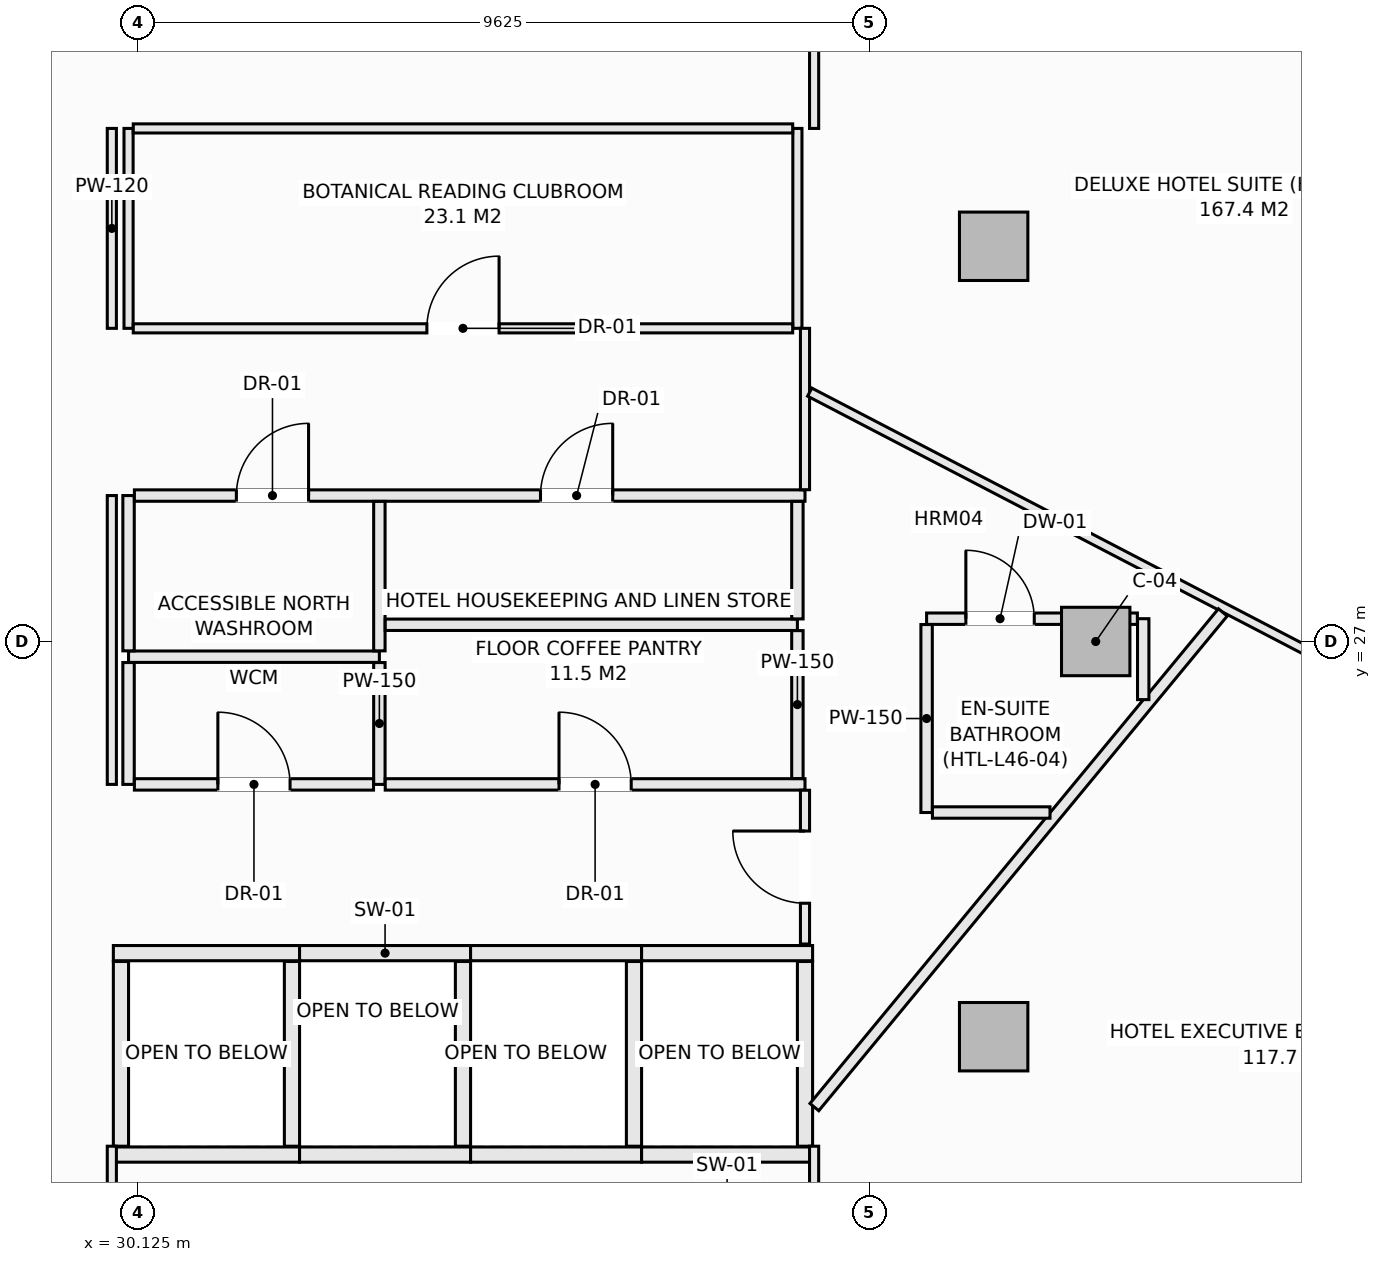
"""IFC4 building model, lengths in metres.
Left out: names, types, materials, properties, quantities, classifications, styles, units other than length and angle.
Written with IfcOpenShell. Run it as: python <this file> out.ifc"""

import sys

from ifc_helpers import new_model, si_unit, direction, frame, frame_2d, origin, origin_2d, place, context, subcontext, project, spatial, rectangle, extrude, element, fill, save


model = new_model("IFC4")
c1 = context("Model", 3, precision=1e-05, world=origin(), true_north=direction((0.0, 1.0)))
c2 = subcontext(c1, "Body", "Model", "MODEL_VIEW")
j1 = project(units=[si_unit("LENGTHUNIT", "METRE"), si_unit("PLANEANGLEUNIT", "RADIAN")], contexts=[c1])
p1 = place(None, origin())
s1 = spatial("IfcSite", under=j1, at=p1, CompositionType="ELEMENT")
p2 = place(p1, origin())
s2 = spatial("IfcBuilding", under=s1, at=p2, CompositionType="ELEMENT")
p3 = place(p2, frame((0.0, 0.0, 176.7)))
s3 = spatial("IfcBuildingStorey", under=s2, at=p3, CompositionType="ELEMENT", Elevation=176.7)
for number, where, z_axis, x_axis in (
    (1, (42.725, 27.0, -0.27), (0.0, 0.0, 1.0), (1.0, 0.0, 0.0)),
    (2, (41.382, 32.199, -0.27), (0.0, 0.0, 1.0), (1.0, 0.0, 0.0)),
    (3, (41.382, 21.801, -0.27), (0.0, 0.0, 1.0), (1.0, 0.0, 0.0)),
):
    element("IfcColumn", number, at=place(p3, frame(where, z_axis=z_axis, x_axis=x_axis)), inside=s3, PredefinedType="COLUMN", context=c2, shape_type="SweptSolid", body=[
        extrude(rectangle(XDim=0.9, YDim=0.9, at=origin_2d()), origin(), (0.0, 0.0, 1.0), 3.4),
    ])
for number, where, z_axis, x_axis in (
    (4, (29.8, 22.9, 0.0), (0.0, 0.0, 1.0), (1.0, 0.0, 0.0)),
    (5, (29.8, 20.25, 0.0), (0.0, 0.0, 1.0), (1.0, 0.0, 0.0)),
):
    element("IfcWall", number, at=place(p3, frame(where, z_axis=z_axis, x_axis=x_axis)), inside=s3, PredefinedType="SOLIDWALL", context=c2, shape_type="SweptSolid", body=[
        extrude(rectangle(XDim=2.45, YDim=0.2, at=frame_2d((1.225, 0.0))), origin(), (0.0, 0.0, 1.0), 3.13),
    ])
for number, where, z_axis, x_axis in (
    (6, (29.9, 20.36, 0.0), (0.0, 0.0, 1.0), (0.0, 1.0, 0.0)),
    (7, (32.15, 20.36, 0.0), (0.0, 0.0, 1.0), (0.0, 1.0, 0.0)),
):
    element("IfcWall", number, at=place(p3, frame(where, z_axis=z_axis, x_axis=x_axis)), inside=s3, PredefinedType="SOLIDWALL", context=c2, shape_type="SweptSolid", body=[
        extrude(rectangle(XDim=2.43, YDim=0.2, at=frame_2d((1.215, 0.0))), origin(), (0.0, 0.0, 1.0), 3.13),
    ])
for number, where, z_axis, x_axis in (
    (8, (32.25, 22.9, 0.0), (0.0, 0.0, 1.0), (1.0, 0.0, 0.0)),
    (9, (32.25, 20.25, 0.0), (0.0, 0.0, 1.0), (1.0, 0.0, 0.0)),
):
    element("IfcWall", number, at=place(p3, frame(where, z_axis=z_axis, x_axis=x_axis)), inside=s3, PredefinedType="SOLIDWALL", context=c2, shape_type="SweptSolid", body=[
        extrude(rectangle(XDim=2.25, YDim=0.2, at=frame_2d((1.125, 0.0))), origin(), (0.0, 0.0, 1.0), 3.13),
    ])
p4 = place(p3, frame((34.4, 20.36, 0.0), z_axis=(0.0, 0.0, 1.0), x_axis=(0.0, 1.0, 0.0)))
e10 = element("IfcWall", 10, at=p4, inside=s3, PredefinedType="SOLIDWALL", context=c2, shape_type="SweptSolid", body=[
    extrude(rectangle(XDim=2.43, YDim=0.2, at=frame_2d((1.215, 0.0))), origin(), (0.0, 0.0, 1.0), 3.13),
])
for number, where, z_axis, x_axis in (
    (11, (34.5, 22.9, 0.0), (0.0, 0.0, 1.0), (1.0, 0.0, 0.0)),
    (12, (34.5, 20.25, 0.0), (0.0, 0.0, 1.0), (1.0, 0.0, 0.0)),
):
    element("IfcWall", number, at=place(p3, frame(where, z_axis=z_axis, x_axis=x_axis)), inside=s3, PredefinedType="SOLIDWALL", context=c2, shape_type="SweptSolid", body=[
        extrude(rectangle(XDim=2.25, YDim=0.2, at=frame_2d((1.125, 0.0))), origin(), (0.0, 0.0, 1.0), 3.13),
    ])
p5 = place(p3, frame((36.65, 20.36, 0.0), z_axis=(0.0, 0.0, 1.0), x_axis=(0.0, 1.0, 0.0)))
e13 = element("IfcWall", 13, at=p5, inside=s3, PredefinedType="SOLIDWALL", context=c2, shape_type="SweptSolid", body=[
    extrude(rectangle(XDim=2.43, YDim=0.2, at=frame_2d((1.215, 0.0))), origin(), (0.0, 0.0, 1.0), 3.13),
])
for number, where, z_axis, x_axis in (
    (14, (36.75, 22.9, 0.0), (0.0, 0.0, 1.0), (1.0, 0.0, 0.0)),
    (15, (36.75, 20.25, 0.0), (0.0, 0.0, 1.0), (1.0, 0.0, 0.0)),
):
    element("IfcWall", number, at=place(p3, frame(where, z_axis=z_axis, x_axis=x_axis)), inside=s3, PredefinedType="SOLIDWALL", context=c2, shape_type="SweptSolid", body=[
        extrude(rectangle(XDim=2.25, YDim=0.2, at=frame_2d((1.125, 0.0))), origin(), (0.0, 0.0, 1.0), 3.13),
    ])
p6 = place(p3, frame((38.9, 20.36, 0.0), z_axis=(0.0, 0.0, 1.0), x_axis=(0.0, 1.0, 0.0)))
e16 = element("IfcWall", 16, at=p6, inside=s3, PredefinedType="SOLIDWALL", context=c2, shape_type="SweptSolid", body=[
    extrude(rectangle(XDim=2.43, YDim=0.2, at=frame_2d((1.215, 0.0))), origin(), (0.0, 0.0, 1.0), 3.13),
])
p7 = place(p3, frame((30.0, 26.8, 0.0), z_axis=(0.0, 0.0, 1.0), x_axis=(1.0, 0.0, 0.0)))
e17 = element("IfcWall", 17, at=p7, inside=s3, PredefinedType="PARTITIONING", context=c2, shape_type="SweptSolid", body=[
    extrude(rectangle(XDim=3.3, YDim=0.15, at=frame_2d((1.65, 0.0))), origin(), (0.0, 0.0, 1.0), 3.13),
])
p8 = place(p3, frame((30.0, 25.12, 0.0), z_axis=(0.0, 0.0, 1.0), x_axis=(0.0, 1.0, 0.0)))
e18 = element("IfcWall", 18, at=p8, inside=s3, PredefinedType="PARTITIONING", context=c2, shape_type="SweptSolid", body=[
    extrude(rectangle(XDim=1.603, YDim=0.15, at=frame_2d((0.801, 0.0))), origin(), (0.0, 0.0, 1.0), 3.13),
])
p9 = place(p3, frame((30.0, 26.877, 0.0), z_axis=(0.0, 0.0, 1.0), x_axis=(0.0, 1.0, 0.0)))
e19 = element("IfcWall", 19, at=p9, inside=s3, PredefinedType="PARTITIONING", context=c2, shape_type="SweptSolid", body=[
    extrude(rectangle(XDim=2.043, YDim=0.15, at=frame_2d((1.021, 0.0))), origin(), (0.0, 0.0, 1.0), 3.13),
])
p10 = place(p3, frame((30.0, 31.12, 0.0), z_axis=(0.0, 0.0, 1.0), x_axis=(0.0, 1.0, 0.0)))
e20 = element("IfcWall", 20, at=p10, inside=s3, PredefinedType="PARTITIONING", context=c2, shape_type="SweptSolid", body=[
    extrude(rectangle(XDim=2.63, YDim=0.12, at=frame_2d((1.315, 0.0))), origin(), (0.0, 0.0, 1.0), 3.13),
])
p11 = place(p3, frame((30.077, 28.92, 0.0), z_axis=(0.0, 0.0, 1.0), x_axis=(1.0, 0.0, 0.0)))
e21 = element("IfcWall", 21, at=p11, inside=s3, PredefinedType="PARTITIONING", context=c2, shape_type="SweptSolid", body=[
    extrude(rectangle(XDim=8.823, YDim=0.15, at=frame_2d((4.412, 0.0))), origin(), (0.0, 0.0, 1.0), 3.13),
])
p12 = place(p11, frame((1.342, 0.0, 0.0)))
e22 = element("IfcOpeningElement", 22, at=p12, cuts=e21, PredefinedType="OPENING", context=c2, shape_type="SweptSolid", body=[
    extrude(rectangle(XDim=0.95, YDim=2.1, at=frame_2d((0.475, 1.05))), frame((0.0, 0.085, 0.0), z_axis=(0.0, -1.0, 0.0), x_axis=(1.0, 0.0, 0.0)), (0.0, 0.0, 1.0), 0.17),
])
p13 = place(p11, frame((5.343, 0.0, 0.0)))
e23 = element("IfcOpeningElement", 23, at=p13, cuts=e21, PredefinedType="OPENING", context=c2, shape_type="SweptSolid", body=[
    extrude(rectangle(XDim=0.95, YDim=2.1, at=frame_2d((0.475, 1.05))), frame((0.0, 0.085, 0.0), z_axis=(0.0, -1.0, 0.0), x_axis=(1.0, 0.0, 0.0)), (0.0, 0.0, 1.0), 0.17),
])
p14 = place(p3, frame((33.3, 25.12, 0.0), z_axis=(0.0, 0.0, 1.0), x_axis=(0.0, 1.0, 0.0)))
e24 = element("IfcWall", 24, at=p14, inside=s3, PredefinedType="PARTITIONING", context=c2, shape_type="SweptSolid", body=[
    extrude(rectangle(XDim=1.603, YDim=0.15, at=frame_2d((0.801, 0.0))), origin(), (0.0, 0.0, 1.0), 3.13),
])
p15 = place(p3, frame((33.3, 26.877, 0.0), z_axis=(0.0, 0.0, 1.0), x_axis=(0.0, 1.0, 0.0)))
e25 = element("IfcWall", 25, at=p15, inside=s3, PredefinedType="PARTITIONING", context=c2, shape_type="SweptSolid", body=[
    extrude(rectangle(XDim=1.966, YDim=0.15, at=frame_2d((0.983, 0.0))), origin(), (0.0, 0.0, 1.0), 3.13),
])
p16 = place(p3, frame((30.077, 25.12, 0.0), z_axis=(0.0, 0.0, 1.0), x_axis=(1.0, 0.0, 0.0)))
e26 = element("IfcWall", 26, at=p16, inside=s3, PredefinedType="PARTITIONING", context=c2, shape_type="SweptSolid", body=[
    extrude(rectangle(XDim=3.146, YDim=0.15, at=frame_2d((1.573, 0.0))), origin(), (0.0, 0.0, 1.0), 3.13),
])
p17 = place(p16, frame((1.098, 0.0, 0.0)))
e27 = element("IfcOpeningElement", 27, at=p17, cuts=e26, PredefinedType="OPENING", context=c2, shape_type="SweptSolid", body=[
    extrude(rectangle(XDim=0.95, YDim=2.1, at=frame_2d((0.475, 1.05))), frame((0.0, 0.085, 0.0), z_axis=(0.0, -1.0, 0.0), x_axis=(1.0, 0.0, 0.0)), (0.0, 0.0, 1.0), 0.17),
])
p18 = place(p3, frame((33.377, 25.12, 0.0), z_axis=(0.0, 0.0, 1.0), x_axis=(1.0, 0.0, 0.0)))
e28 = element("IfcWall", 28, at=p18, inside=s3, PredefinedType="PARTITIONING", context=c2, shape_type="SweptSolid", body=[
    extrude(rectangle(XDim=5.523, YDim=0.15, at=frame_2d((2.761, 0.0))), origin(), (0.0, 0.0, 1.0), 3.13),
])
p19 = place(p18, frame((2.287, 0.0, 0.0)))
e29 = element("IfcOpeningElement", 29, at=p19, cuts=e28, PredefinedType="OPENING", context=c2, shape_type="SweptSolid", body=[
    extrude(rectangle(XDim=0.95, YDim=2.1, at=frame_2d((0.475, 1.05))), frame((0.0, 0.085, 0.0), z_axis=(0.0, -1.0, 0.0), x_axis=(1.0, 0.0, 0.0)), (0.0, 0.0, 1.0), 0.17),
])
p20 = place(p3, frame((33.377, 27.22, 0.0), z_axis=(0.0, 0.0, 1.0), x_axis=(1.0, 0.0, 0.0)))
e30 = element("IfcWall", 30, at=p20, inside=s3, PredefinedType="PARTITIONING", context=c2, shape_type="SweptSolid", body=[
    extrude(rectangle(XDim=5.423, YDim=0.15, at=frame_2d((2.711, 0.0))), origin(), (0.0, 0.0, 1.0), 3.13),
])
p21 = place(p3, frame((38.8, 25.197, 0.0), z_axis=(0.0, 0.0, 1.0), x_axis=(0.0, 1.0, 0.0)))
e31 = element("IfcWall", 31, at=p21, inside=s3, PredefinedType="PARTITIONING", context=c2, shape_type="SweptSolid", body=[
    extrude(rectangle(XDim=1.946, YDim=0.15, at=frame_2d((0.973, 0.0))), origin(), (0.0, 0.0, 1.0), 3.13),
])
p22 = place(p3, frame((38.8, 27.297, 0.0), z_axis=(0.0, 0.0, 1.0), x_axis=(0.0, 1.0, 0.0)))
e32 = element("IfcWall", 32, at=p22, inside=s3, PredefinedType="PARTITIONING", context=c2, shape_type="SweptSolid", body=[
    extrude(rectangle(XDim=1.546, YDim=0.15, at=frame_2d((0.773, 0.0))), origin(), (0.0, 0.0, 1.0), 3.13),
])
p23 = place(p3, frame((38.8, 31.12, 0.0), z_axis=(0.0, 0.0, 1.0), x_axis=(0.0, 1.0, 0.0)))
e33 = element("IfcWall", 33, at=p23, inside=s3, PredefinedType="PARTITIONING", context=c2, shape_type="SweptSolid", body=[
    extrude(rectangle(XDim=2.63, YDim=0.12, at=frame_2d((1.315, 0.0))), origin(), (0.0, 0.0, 1.0), 3.13),
])
p24 = place(p3, frame((30.062, 31.12, 0.0), z_axis=(0.0, 0.0, 1.0), x_axis=(1.0, 0.0, 0.0)))
e34 = element("IfcWall", 34, at=p24, inside=s3, PredefinedType="PARTITIONING", context=c2, shape_type="SweptSolid", body=[
    extrude(rectangle(XDim=8.676, YDim=0.12, at=frame_2d((4.338, 0.0))), origin(), (0.0, 0.0, 1.0), 3.13),
])
p25 = place(p24, frame((3.863, 0.0, 0.0)))
e35 = element("IfcOpeningElement", 35, at=p25, cuts=e34, PredefinedType="OPENING", context=c2, shape_type="SweptSolid", body=[
    extrude(rectangle(XDim=0.95, YDim=2.1, at=frame_2d((0.475, 1.05))), frame((0.0, 0.07, 0.0), z_axis=(0.0, -1.0, 0.0), x_axis=(1.0, 0.0, 0.0)), (0.0, 0.0, 1.0), 0.14),
])
p26 = place(p3, frame((30.062, 33.75, 0.0), z_axis=(0.0, 0.0, 1.0), x_axis=(1.0, 0.0, 0.0)))
e36 = element("IfcWall", 36, at=p26, inside=s3, PredefinedType="PARTITIONING", context=c2, shape_type="SweptSolid", body=[
    extrude(rectangle(XDim=8.676, YDim=0.12, at=frame_2d((4.338, 0.0))), origin(), (0.0, 0.0, 1.0), 3.13),
])
p27 = place(p3, frame((39.02, 19.44, 0.0), z_axis=(0.0, 0.0, 1.0), x_axis=(0.0, 1.0, 0.0)))
e37 = element("IfcWall", 37, at=p27, inside=s3, PredefinedType="PARTITIONING", context=c2, shape_type="SweptSolid", body=[
    extrude(rectangle(XDim=0.92, YDim=0.12, at=frame_2d((0.46, 0.0))), origin(), (0.0, 0.0, 1.0), 3.13),
])
p28 = place(p3, frame((39.02, 33.75, 0.0), z_axis=(0.0, 0.0, 1.0), x_axis=(0.0, 1.0, 0.0)))
e38 = element("IfcWall", 38, at=p28, inside=s3, PredefinedType="PARTITIONING", context=c2, shape_type="SweptSolid", body=[
    extrude(rectangle(XDim=2.0, YDim=0.12, at=frame_2d((1.0, 0.0))), origin(), (0.0, 0.0, 1.0), 3.13),
])
p29 = place(p3, frame((29.78, 19.44, 0.0), z_axis=(0.0, 0.0, 1.0), x_axis=(0.0, 1.0, 0.0)))
e39 = element("IfcWall", 39, at=p29, inside=s3, PredefinedType="PARTITIONING", context=c2, shape_type="SweptSolid", body=[
    extrude(rectangle(XDim=0.92, YDim=0.12, at=frame_2d((0.46, 0.0))), origin(), (0.0, 0.0, 1.0), 3.13),
])
p30 = place(p3, frame((29.78, 25.12, 0.0), z_axis=(0.0, 0.0, 1.0), x_axis=(0.0, 1.0, 0.0)))
e40 = element("IfcWall", 40, at=p30, inside=s3, PredefinedType="PARTITIONING", context=c2, shape_type="SweptSolid", body=[
    extrude(rectangle(XDim=3.8, YDim=0.12, at=frame_2d((1.9, 0.0))), origin(), (0.0, 0.0, 1.0), 3.13),
])
p31 = place(p3, frame((29.78, 31.12, 0.0), z_axis=(0.0, 0.0, 1.0), x_axis=(0.0, 1.0, 0.0)))
e41 = element("IfcWall", 41, at=p31, inside=s3, PredefinedType="PARTITIONING", context=c2, shape_type="SweptSolid", body=[
    extrude(rectangle(XDim=2.63, YDim=0.12, at=frame_2d((1.315, 0.0))), origin(), (0.0, 0.0, 1.0), 3.13),
])
p32 = place(p3, frame((38.9, 23.02, 0.0), z_axis=(0.0, 0.0, 1.0), x_axis=(0.0, 1.0, 0.0)))
e42 = element("IfcWall", 42, at=p32, inside=s3, PredefinedType="PARTITIONING", context=c2, shape_type="SweptSolid", body=[
    extrude(rectangle(XDim=2.023, YDim=0.12, at=frame_2d((1.011, 0.0))), origin(), (0.0, 0.0, 1.0), 3.13),
])
p33 = place(p32, frame((0.537, 0.0, 0.0)))
e43 = element("IfcOpeningElement", 43, at=p33, cuts=e42, PredefinedType="OPENING", context=c2, shape_type="SweptSolid", body=[
    extrude(rectangle(XDim=0.95, YDim=2.1, at=frame_2d((0.475, 1.05))), frame((0.0, 0.07, 0.0), z_axis=(0.0, -1.0, 0.0), x_axis=(1.0, 0.0, 0.0)), (0.0, 0.0, 1.0), 0.14),
])
p34 = place(p3, frame((38.9, 28.997, 0.0), z_axis=(0.0, 0.0, 1.0), x_axis=(0.0, 1.0, 0.0)))
e44 = element("IfcWall", 44, at=p34, inside=s3, PredefinedType="PARTITIONING", context=c2, shape_type="SweptSolid", body=[
    extrude(rectangle(XDim=2.123, YDim=0.12, at=frame_2d((1.062, 0.0))), origin(), (0.0, 0.0, 1.0), 3.13),
])
p35 = place(p3, frame((38.962, 30.281, 0.0), z_axis=(0.0, 0.0, 1.0), x_axis=(0.887114590422, -0.461549242725, 0.0)))
e45 = element("IfcWall", 45, at=p35, inside=s3, PredefinedType="PARTITIONING", context=c2, shape_type="SweptSolid", body=[
    extrude(rectangle(XDim=14.004, YDim=0.12, at=frame_2d((7.002, 0.0))), origin(), (0.0, 0.0, 1.0), 2.505),
])
p36 = place(p3, frame((39.023, 20.874, 0.0), z_axis=(0.0, 0.0, 1.0), x_axis=(0.636698291185, 0.771113017658, 0.0)))
e46 = element("IfcWall", 46, at=p36, inside=s3, PredefinedType="PARTITIONING", context=c2, shape_type="SweptSolid", body=[
    extrude(rectangle(XDim=8.44, YDim=0.15, at=frame_2d((4.22, 0.0))), origin(), (0.0, 0.0, 1.0), 2.505),
])
p37 = place(p3, frame((43.35, 26.235, 0.0), z_axis=(0.0, 0.0, 1.0), x_axis=(0.0, 1.0, 0.0)))
e47 = element("IfcWall", 47, at=p37, inside=s3, PredefinedType="PARTITIONING", context=c2, shape_type="SweptSolid", body=[
    extrude(rectangle(XDim=1.065, YDim=0.15, at=frame_2d((0.532, 0.0))), origin(), (0.0, 0.0, 1.0), 3.13),
])
p38 = place(p3, frame((40.5, 27.3, 0.0), z_axis=(0.0, 0.0, 1.0), x_axis=(1.0, 0.0, 0.0)))
e48 = element("IfcWall", 48, at=p38, inside=s3, PredefinedType="PARTITIONING", context=c2, shape_type="SweptSolid", body=[
    extrude(rectangle(XDim=2.773, YDim=0.15, at=frame_2d((1.386, 0.0))), origin(), (0.0, 0.0, 1.0), 3.13),
])
p39 = place(p38, frame((0.517, 0.0, 0.0)))
e49 = element("IfcOpeningElement", 49, at=p39, cuts=e48, PredefinedType="OPENING", context=c2, shape_type="SweptSolid", body=[
    extrude(rectangle(XDim=0.9, YDim=2.1, at=frame_2d((0.45, 1.05))), frame((0.0, 0.085, 0.0), z_axis=(0.0, -1.0, 0.0), x_axis=(1.0, 0.0, 0.0)), (0.0, 0.0, 1.0), 0.17),
])
p40 = place(p3, frame((40.5, 24.75, 0.0), z_axis=(0.0, 0.0, 1.0), x_axis=(0.0, 1.0, 0.0)))
e50 = element("IfcWall", 50, at=p40, inside=s3, PredefinedType="PARTITIONING", context=c2, shape_type="SweptSolid", body=[
    extrude(rectangle(XDim=2.473, YDim=0.15, at=frame_2d((1.236, 0.0))), origin(), (0.0, 0.0, 1.0), 3.13),
])
p41 = place(p3, frame((40.577, 24.75, 0.0), z_axis=(0.0, 0.0, 1.0), x_axis=(1.0, 0.0, 0.0)))
e51 = element("IfcWall", 51, at=p41, inside=s3, PredefinedType="PARTITIONING", context=c2, shape_type="SweptSolid", body=[
    extrude(rectangle(XDim=1.547, YDim=0.15, at=frame_2d((0.773, 0.0))), origin(), (0.0, 0.0, 1.0), 3.13),
])
p42 = place(p12, origin())
e52 = element("IfcDoor", 52, at=p42, inside=s3, OperationType="SINGLE_SWING_RIGHT", PredefinedType="DOOR", context=c2, shape_type="SweptSolid", body=[
    extrude(rectangle(XDim=0.95, YDim=2.1, at=frame_2d((0.475, 1.05))), frame((0.0, 0.025, 0.0), z_axis=(0.0, -1.0, 0.0), x_axis=(1.0, 0.0, 0.0)), (0.0, 0.0, 1.0), 0.05),
])
fill(e22, e52)
p43 = place(p17, origin())
e53 = element("IfcDoor", 53, at=p43, inside=s3, OperationType="SINGLE_SWING_LEFT", PredefinedType="DOOR", context=c2, shape_type="SweptSolid", body=[
    extrude(rectangle(XDim=0.95, YDim=2.1, at=frame_2d((0.475, 1.05))), frame((0.0, 0.025, 0.0), z_axis=(0.0, -1.0, 0.0), x_axis=(1.0, 0.0, 0.0)), (0.0, 0.0, 1.0), 0.05),
])
fill(e27, e53)
p44 = place(p13, origin())
e54 = element("IfcDoor", 54, at=p44, inside=s3, OperationType="SINGLE_SWING_RIGHT", PredefinedType="DOOR", context=c2, shape_type="SweptSolid", body=[
    extrude(rectangle(XDim=0.95, YDim=2.1, at=frame_2d((0.475, 1.05))), frame((0.0, 0.025, 0.0), z_axis=(0.0, -1.0, 0.0), x_axis=(1.0, 0.0, 0.0)), (0.0, 0.0, 1.0), 0.05),
])
fill(e23, e54)
p45 = place(p19, origin())
e55 = element("IfcDoor", 55, at=p45, inside=s3, OperationType="SINGLE_SWING_LEFT", PredefinedType="DOOR", context=c2, shape_type="SweptSolid", body=[
    extrude(rectangle(XDim=0.95, YDim=2.1, at=frame_2d((0.475, 1.05))), frame((0.0, 0.025, 0.0), z_axis=(0.0, -1.0, 0.0), x_axis=(1.0, 0.0, 0.0)), (0.0, 0.0, 1.0), 0.05),
])
fill(e29, e55)
p46 = place(p25, origin())
e56 = element("IfcDoor", 56, at=p46, inside=s3, OperationType="SINGLE_SWING_RIGHT", PredefinedType="DOOR", context=c2, shape_type="SweptSolid", body=[
    extrude(rectangle(XDim=0.95, YDim=2.1, at=frame_2d((0.475, 1.05))), frame((0.0, 0.025, 0.0), z_axis=(0.0, -1.0, 0.0), x_axis=(1.0, 0.0, 0.0)), (0.0, 0.0, 1.0), 0.05),
])
fill(e35, e56)
p47 = place(p33, origin())
e57 = element("IfcDoor", 57, at=p47, inside=s3, OperationType="SINGLE_SWING_RIGHT", PredefinedType="DOOR", context=c2, shape_type="SweptSolid", body=[
    extrude(rectangle(XDim=0.95, YDim=2.1, at=frame_2d((0.475, 1.05))), frame((0.0, 0.025, 0.0), z_axis=(0.0, -1.0, 0.0), x_axis=(1.0, 0.0, 0.0)), (0.0, 0.0, 1.0), 0.05),
])
fill(e43, e57)
p48 = place(p39, origin())
e58 = element("IfcDoor", 58, at=p48, inside=s3, OperationType="SINGLE_SWING_LEFT", PredefinedType="DOOR", context=c2, shape_type="SweptSolid", body=[
    extrude(rectangle(XDim=0.9, YDim=2.1, at=frame_2d((0.45, 1.05))), frame((0.0, 0.025, 0.0), z_axis=(0.0, -1.0, 0.0), x_axis=(1.0, 0.0, 0.0)), (0.0, 0.0, 1.0), 0.05),
])
fill(e49, e58)
save(model, sys.argv[1])
